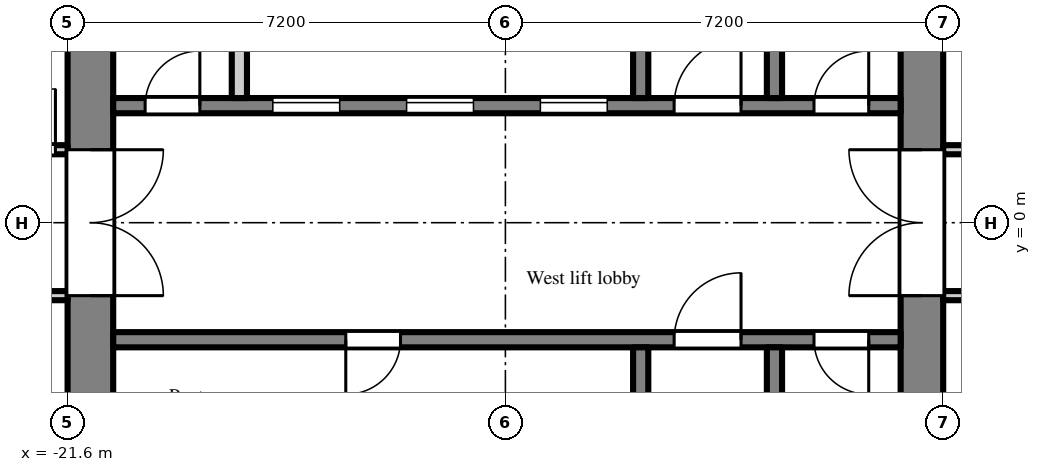
"""IFC4 building model, lengths in metres.
Left out: names, types, materials, properties, quantities, classifications, styles, units other than length and angle.
Written with IfcOpenShell. Run it as: python <this file> out.ifc"""

import sys

from ifc_helpers import new_model, si_unit, direction, frame, frame_2d, origin, place, context, subcontext, project, spatial, rectangle, extrude, element, fill, save


model = new_model("IFC4")
c1 = context("Model", 3, precision=1e-05, world=origin(), true_north=direction((0.0, 1.0)))
c2 = subcontext(c1, "Body", "Model", "MODEL_VIEW")
j1 = project(units=[si_unit("LENGTHUNIT", "METRE"), si_unit("PLANEANGLEUNIT", "RADIAN")], contexts=[c1])
p1 = place(None, origin())
s1 = spatial("IfcSite", under=j1, at=p1, CompositionType="ELEMENT")
p2 = place(p1, origin())
s2 = spatial("IfcBuilding", under=s1, at=p2, CompositionType="ELEMENT")
p3 = place(p2, frame((0.0, 0.0, 216.9)))
s3 = spatial("IfcBuildingStorey", under=s2, at=p3, CompositionType="ELEMENT", Elevation=216.9)
p4 = place(p3, frame((-7.55, -7.2, 0.0), z_axis=(0.0, 0.0, 1.0), x_axis=(0.0, 1.0, 0.0)))
e1 = element("IfcWall", 1, at=p4, inside=s3, PredefinedType="SHEAR", context=c2, shape_type="SweptSolid", body=[
    extrude(rectangle(XDim=14.4, YDim=0.7, at=frame_2d((7.2, 0.0))), origin(), (0.0, 0.0, 1.0), 2.6),
])
p5 = place(p4, frame((6.0, 0.0, 0.0)))
e2 = element("IfcOpeningElement", 2, at=p5, cuts=e1, PredefinedType="OPENING", context=c2, shape_type="SweptSolid", body=[
    extrude(rectangle(XDim=2.4, YDim=2.2, at=frame_2d((1.2, 1.1))), frame((0.0, 0.36, 0.0), z_axis=(0.0, -1.0, 0.0), x_axis=(1.0, 0.0, 0.0)), (0.0, 0.0, 1.0), 0.72),
])
p6 = place(p3, frame((-21.225, -7.2, 0.0), z_axis=(0.0, 0.0, 1.0), x_axis=(0.0, 1.0, 0.0)))
e3 = element("IfcWall", 3, at=p6, inside=s3, PredefinedType="SHEAR", context=c2, shape_type="SweptSolid", body=[
    extrude(rectangle(XDim=14.4, YDim=0.75, at=frame_2d((7.2, 0.0))), origin(), (0.0, 0.0, 1.0), 2.6),
])
p7 = place(p6, frame((6.0, 0.0, 0.0)))
e4 = element("IfcOpeningElement", 4, at=p7, cuts=e3, PredefinedType="OPENING", context=c2, shape_type="SweptSolid", body=[
    extrude(rectangle(XDim=2.4, YDim=2.2, at=frame_2d((1.2, 1.1))), frame((0.0, 0.385, 0.0), z_axis=(0.0, -1.0, 0.0), x_axis=(1.0, 0.0, 0.0)), (0.0, 0.0, 1.0), 0.77),
])
p8 = place(p3, frame((-7.9, 1.925, 0.0), z_axis=(0.0, 0.0, 1.0), x_axis=(-1.0, 0.0, 0.0)))
e5 = element("IfcWall", 5, at=p8, inside=s3, PredefinedType="SHEAR", context=c2, shape_type="SweptSolid", body=[
    extrude(rectangle(XDim=12.95, YDim=0.25, at=frame_2d((6.475, 0.0))), origin(), (0.0, 0.0, 1.0), 2.6),
])
p9 = place(p8, frame((4.825, 0.0, 0.0)))
e6 = element("IfcOpeningElement", 6, at=p9, cuts=e5, PredefinedType="OPENING", context=c2, shape_type="SweptSolid", body=[
    extrude(rectangle(XDim=1.1, YDim=2.1, at=frame_2d((0.55, 1.05))), frame((0.0, 0.135, 0.0), z_axis=(0.0, -1.0, 0.0), x_axis=(1.0, 0.0, 0.0)), (0.0, 0.0, 1.0), 0.27),
])
p10 = place(p8, frame((7.025, 0.0, 0.0)))
e7 = element("IfcOpeningElement", 7, at=p10, cuts=e5, PredefinedType="OPENING", context=c2, shape_type="SweptSolid", body=[
    extrude(rectangle(XDim=1.1, YDim=2.1, at=frame_2d((0.55, 1.05))), frame((0.0, 0.135, 0.0), z_axis=(0.0, -1.0, 0.0), x_axis=(1.0, 0.0, 0.0)), (0.0, 0.0, 1.0), 0.27),
])
p11 = place(p8, frame((9.225, 0.0, 0.0)))
e8 = element("IfcOpeningElement", 8, at=p11, cuts=e5, PredefinedType="OPENING", context=c2, shape_type="SweptSolid", body=[
    extrude(rectangle(XDim=1.1, YDim=2.1, at=frame_2d((0.55, 1.05))), frame((0.0, 0.135, 0.0), z_axis=(0.0, -1.0, 0.0), x_axis=(1.0, 0.0, 0.0)), (0.0, 0.0, 1.0), 0.27),
])
p12 = place(p8, frame((0.525, 0.0, 0.0)))
e9 = element("IfcOpeningElement", 9, at=p12, cuts=e5, PredefinedType="OPENING", context=c2, shape_type="SweptSolid", body=[
    extrude(rectangle(XDim=0.9, YDim=2.1, at=frame_2d((0.45, 1.05))), frame((0.0, 0.135, 0.0), z_axis=(0.0, -1.0, 0.0), x_axis=(1.0, 0.0, 0.0)), (0.0, 0.0, 1.0), 0.27),
])
p13 = place(p8, frame((2.625, 0.0, 0.0)))
e10 = element("IfcOpeningElement", 10, at=p13, cuts=e5, PredefinedType="OPENING", context=c2, shape_type="SweptSolid", body=[
    extrude(rectangle(XDim=1.1, YDim=2.1, at=frame_2d((0.55, 1.05))), frame((0.0, 0.135, 0.0), z_axis=(0.0, -1.0, 0.0), x_axis=(1.0, 0.0, 0.0)), (0.0, 0.0, 1.0), 0.27),
])
p14 = place(p8, frame((11.525, 0.0, 0.0)))
e11 = element("IfcOpeningElement", 11, at=p14, cuts=e5, PredefinedType="OPENING", context=c2, shape_type="SweptSolid", body=[
    extrude(rectangle(XDim=0.9, YDim=2.1, at=frame_2d((0.45, 1.05))), frame((0.0, 0.135, 0.0), z_axis=(0.0, -1.0, 0.0), x_axis=(1.0, 0.0, 0.0)), (0.0, 0.0, 1.0), 0.27),
])
p15 = place(p3, frame((-9.975, 2.05, 0.0), z_axis=(0.0, 0.0, 1.0), x_axis=(0.0, 1.0, 0.0)))
e12 = element("IfcWall", 12, at=p15, inside=s3, PredefinedType="SHEAR", context=c2, shape_type="SweptSolid", body=[
    extrude(rectangle(XDim=4.75, YDim=0.25, at=frame_2d((2.375, 0.0))), origin(), (0.0, 0.0, 1.0), 2.6),
])
p16 = place(p15, frame((2.95, 0.0, 0.0)))
e13 = element("IfcOpeningElement", 13, at=p16, cuts=e12, PredefinedType="OPENING", context=c2, shape_type="SweptSolid", body=[
    extrude(rectangle(XDim=1.1, YDim=2.1, at=frame_2d((0.55, 1.05))), frame((0.0, 0.135, 0.0), z_axis=(0.0, -1.0, 0.0), x_axis=(1.0, 0.0, 0.0)), (0.0, 0.0, 1.0), 0.27),
])
p17 = place(p3, frame((-12.175, 2.05, 0.0), z_axis=(0.0, 0.0, 1.0), x_axis=(0.0, 1.0, 0.0)))
e14 = element("IfcWall", 14, at=p17, inside=s3, PredefinedType="SHEAR", context=c2, shape_type="SweptSolid", body=[
    extrude(rectangle(XDim=4.75, YDim=0.25, at=frame_2d((2.375, 0.0))), origin(), (0.0, 0.0, 1.0), 2.6),
])
p18 = place(p17, frame((3.0, 0.0, 0.0)))
e15 = element("IfcOpeningElement", 15, at=p18, cuts=e14, PredefinedType="OPENING", context=c2, shape_type="SweptSolid", body=[
    extrude(rectangle(XDim=1.1, YDim=2.1, at=frame_2d((0.55, 1.05))), frame((0.0, 0.135, 0.0), z_axis=(0.0, -1.0, 0.0), x_axis=(1.0, 0.0, 0.0)), (0.0, 0.0, 1.0), 0.27),
])
p19 = place(p3, frame((-18.775, 2.05, 0.0), z_axis=(0.0, 0.0, 1.0), x_axis=(0.0, 1.0, 0.0)))
e16 = element("IfcWall", 16, at=p19, inside=s3, PredefinedType="PARTITIONING", context=c2, shape_type="SweptSolid", body=[
    extrude(rectangle(XDim=2.1, YDim=0.25, at=frame_2d((1.05, 0.0))), origin(), (0.0, 0.0, 1.0), 2.6),
])
p20 = place(p3, frame((-7.9, -1.925, 0.0), z_axis=(0.0, 0.0, 1.0), x_axis=(-1.0, 0.0, 0.0)))
e17 = element("IfcWall", 17, at=p20, inside=s3, PredefinedType="SHEAR", context=c2, shape_type="SweptSolid", body=[
    extrude(rectangle(XDim=12.95, YDim=0.25, at=frame_2d((6.475, 0.0))), origin(), (0.0, 0.0, 1.0), 2.6),
])
p21 = place(p20, frame((0.525, 0.0, 0.0)))
e18 = element("IfcOpeningElement", 18, at=p21, cuts=e17, PredefinedType="OPENING", context=c2, shape_type="SweptSolid", body=[
    extrude(rectangle(XDim=0.9, YDim=2.1, at=frame_2d((0.45, 1.05))), frame((0.0, 0.135, 0.0), z_axis=(0.0, -1.0, 0.0), x_axis=(1.0, 0.0, 0.0)), (0.0, 0.0, 1.0), 0.27),
])
p22 = place(p20, frame((2.625, 0.0, 0.0)))
e19 = element("IfcOpeningElement", 19, at=p22, cuts=e17, PredefinedType="OPENING", context=c2, shape_type="SweptSolid", body=[
    extrude(rectangle(XDim=1.1, YDim=2.1, at=frame_2d((0.55, 1.05))), frame((0.0, 0.135, 0.0), z_axis=(0.0, -1.0, 0.0), x_axis=(1.0, 0.0, 0.0)), (0.0, 0.0, 1.0), 0.27),
])
p23 = place(p20, frame((8.225, 0.0, 0.0)))
e20 = element("IfcOpeningElement", 20, at=p23, cuts=e17, PredefinedType="OPENING", context=c2, shape_type="SweptSolid", body=[
    extrude(rectangle(XDim=0.9, YDim=2.1, at=frame_2d((0.45, 1.05))), frame((0.0, 0.135, 0.0), z_axis=(0.0, -1.0, 0.0), x_axis=(1.0, 0.0, 0.0)), (0.0, 0.0, 1.0), 0.27),
])
p24 = place(p3, frame((-9.975, -2.05, 0.0), z_axis=(0.0, 0.0, 1.0), x_axis=(0.0, -1.0, 0.0)))
e21 = element("IfcWall", 21, at=p24, inside=s3, PredefinedType="SHEAR", context=c2, shape_type="SweptSolid", body=[
    extrude(rectangle(XDim=4.75, YDim=0.25, at=frame_2d((2.375, 0.0))), origin(), (0.0, 0.0, 1.0), 2.6),
])
p25 = place(p24, frame((2.95, 0.0, 0.0)))
e22 = element("IfcOpeningElement", 22, at=p25, cuts=e21, PredefinedType="OPENING", context=c2, shape_type="SweptSolid", body=[
    extrude(rectangle(XDim=1.1, YDim=2.1, at=frame_2d((0.55, 1.05))), frame((0.0, 0.135, 0.0), z_axis=(0.0, -1.0, 0.0), x_axis=(1.0, 0.0, 0.0)), (0.0, 0.0, 1.0), 0.27),
])
p26 = place(p3, frame((-12.175, -2.05, 0.0), z_axis=(0.0, 0.0, 1.0), x_axis=(0.0, -1.0, 0.0)))
e23 = element("IfcWall", 23, at=p26, inside=s3, PredefinedType="SHEAR", context=c2, shape_type="SweptSolid", body=[
    extrude(rectangle(XDim=4.75, YDim=0.25, at=frame_2d((2.375, 0.0))), origin(), (0.0, 0.0, 1.0), 2.6),
])
p27 = place(p26, frame((3.0, 0.0, 0.0)))
e24 = element("IfcOpeningElement", 24, at=p27, cuts=e23, PredefinedType="OPENING", context=c2, shape_type="SweptSolid", body=[
    extrude(rectangle(XDim=1.1, YDim=2.1, at=frame_2d((0.55, 1.05))), frame((0.0, 0.135, 0.0), z_axis=(0.0, -1.0, 0.0), x_axis=(1.0, 0.0, 0.0)), (0.0, 0.0, 1.0), 0.27),
])
p28 = place(p3, frame((-26.725, -1.2, 0.0), z_axis=(0.0, 0.0, 1.0), x_axis=(1.0, 0.0, 0.0)))
e25 = element("IfcWall", 25, at=p28, inside=s3, PredefinedType="PARTITIONING", context=c2, shape_type="SweptSolid", body=[
    extrude(rectangle(XDim=5.125, YDim=0.15, at=frame_2d((2.562, 0.0))), origin(), (0.0, 0.0, 1.0), 2.6),
])
p29 = place(p28, frame((1.625, 0.0, 0.0)))
e26 = element("IfcOpeningElement", 26, at=p29, cuts=e25, PredefinedType="OPENING", context=c2, shape_type="SweptSolid", body=[
    extrude(rectangle(XDim=1.8, YDim=2.1, at=frame_2d((0.9, 1.05))), frame((0.0, 0.085, 0.0), z_axis=(0.0, -1.0, 0.0), x_axis=(1.0, 0.0, 0.0)), (0.0, 0.0, 1.0), 0.17),
])
p30 = place(p3, frame((-26.725, 1.2, 0.0), z_axis=(0.0, 0.0, 1.0), x_axis=(1.0, 0.0, 0.0)))
e27 = element("IfcWall", 27, at=p30, inside=s3, PredefinedType="PARTITIONING", context=c2, shape_type="SweptSolid", body=[
    extrude(rectangle(XDim=5.125, YDim=0.15, at=frame_2d((2.562, 0.0))), origin(), (0.0, 0.0, 1.0), 2.6),
])
p31 = place(p30, frame((3.925, 0.0, 0.0)))
e28 = element("IfcOpeningElement", 28, at=p31, cuts=e27, PredefinedType="OPENING", context=c2, shape_type="SweptSolid", body=[
    extrude(rectangle(XDim=1.0, YDim=2.1, at=frame_2d((0.5, 1.05))), frame((0.0, 0.085, 0.0), z_axis=(0.0, -1.0, 0.0), x_axis=(1.0, 0.0, 0.0)), (0.0, 0.0, 1.0), 0.17),
])
p32 = place(p3, frame((-7.2, -1.2, 0.0), z_axis=(0.0, 0.0, 1.0), x_axis=(1.0, 0.0, 0.0)))
e29 = element("IfcWall", 29, at=p32, inside=s3, PredefinedType="PARTITIONING", context=c2, shape_type="SweptSolid", body=[
    extrude(rectangle(XDim=6.075, YDim=0.15, at=frame_2d((3.038, 0.0))), origin(), (0.0, 0.0, 1.0), 2.6),
])
p33 = place(p32, frame((2.55, 0.0, 0.0)))
e30 = element("IfcOpeningElement", 30, at=p33, cuts=e29, PredefinedType="OPENING", context=c2, shape_type="SweptSolid", body=[
    extrude(rectangle(XDim=0.9, YDim=2.1, at=frame_2d((0.45, 1.05))), frame((0.0, 0.085, 0.0), z_axis=(0.0, -1.0, 0.0), x_axis=(1.0, 0.0, 0.0)), (0.0, 0.0, 1.0), 0.17),
])
p34 = place(p3, frame((-7.2, 1.2, 0.0), z_axis=(0.0, 0.0, 1.0), x_axis=(1.0, 0.0, 0.0)))
e31 = element("IfcWall", 31, at=p34, inside=s3, PredefinedType="PARTITIONING", context=c2, shape_type="SweptSolid", body=[
    extrude(rectangle(XDim=6.075, YDim=0.15, at=frame_2d((3.038, 0.0))), origin(), (0.0, 0.0, 1.0), 2.6),
])
p35 = place(p34, frame((0.55, 0.0, 0.0)))
e32 = element("IfcOpeningElement", 32, at=p35, cuts=e31, PredefinedType="OPENING", context=c2, shape_type="SweptSolid", body=[
    extrude(rectangle(XDim=0.9, YDim=2.1, at=frame_2d((0.45, 1.05))), frame((0.0, 0.085, 0.0), z_axis=(0.0, -1.0, 0.0), x_axis=(1.0, 0.0, 0.0)), (0.0, 0.0, 1.0), 0.17),
])
p36 = place(p9, origin())
e33 = element("IfcDoor", 33, at=p36, inside=s3, OperationType="SLIDING_TO_LEFT", PredefinedType="DOOR", context=c2, shape_type="SweptSolid", body=[
    extrude(rectangle(XDim=1.1, YDim=2.1, at=frame_2d((0.55, 1.05))), frame((0.0, 0.025, 0.0), z_axis=(0.0, -1.0, 0.0), x_axis=(1.0, 0.0, 0.0)), (0.0, 0.0, 1.0), 0.05),
])
fill(e6, e33)
p37 = place(p10, origin())
e34 = element("IfcDoor", 34, at=p37, inside=s3, OperationType="SLIDING_TO_LEFT", PredefinedType="DOOR", context=c2, shape_type="SweptSolid", body=[
    extrude(rectangle(XDim=1.1, YDim=2.1, at=frame_2d((0.55, 1.05))), frame((0.0, 0.025, 0.0), z_axis=(0.0, -1.0, 0.0), x_axis=(1.0, 0.0, 0.0)), (0.0, 0.0, 1.0), 0.05),
])
fill(e7, e34)
p38 = place(p11, origin())
e35 = element("IfcDoor", 35, at=p38, inside=s3, OperationType="SLIDING_TO_LEFT", PredefinedType="DOOR", context=c2, shape_type="SweptSolid", body=[
    extrude(rectangle(XDim=1.1, YDim=2.1, at=frame_2d((0.55, 1.05))), frame((0.0, 0.025, 0.0), z_axis=(0.0, -1.0, 0.0), x_axis=(1.0, 0.0, 0.0)), (0.0, 0.0, 1.0), 0.05),
])
fill(e8, e35)
p39 = place(p12, frame((0.9, 0.0, 0.0), z_axis=(0.0, 0.0, 1.0), x_axis=(-1.0, 0.0, 0.0)))
e36 = element("IfcDoor", 36, at=p39, inside=s3, OperationType="SINGLE_SWING_RIGHT", PredefinedType="DOOR", context=c2, shape_type="SweptSolid", body=[
    extrude(rectangle(XDim=0.9, YDim=2.1, at=frame_2d((0.45, 1.05))), frame((0.0, 0.025, 0.0), z_axis=(0.0, -1.0, 0.0), x_axis=(1.0, 0.0, 0.0)), (0.0, 0.0, 1.0), 0.05),
])
fill(e9, e36)
p40 = place(p21, origin())
e37 = element("IfcDoor", 37, at=p40, inside=s3, OperationType="SINGLE_SWING_LEFT", PredefinedType="DOOR", context=c2, shape_type="SweptSolid", body=[
    extrude(rectangle(XDim=0.9, YDim=2.1, at=frame_2d((0.45, 1.05))), frame((0.0, 0.025, 0.0), z_axis=(0.0, -1.0, 0.0), x_axis=(1.0, 0.0, 0.0)), (0.0, 0.0, 1.0), 0.05),
])
fill(e18, e37)
p41 = place(p13, frame((1.1, 0.0, 0.0), z_axis=(0.0, 0.0, 1.0), x_axis=(-1.0, 0.0, 0.0)))
e38 = element("IfcDoor", 38, at=p41, inside=s3, OperationType="SINGLE_SWING_RIGHT", PredefinedType="DOOR", context=c2, shape_type="SweptSolid", body=[
    extrude(rectangle(XDim=1.1, YDim=2.1, at=frame_2d((0.55, 1.05))), frame((0.0, 0.025, 0.0), z_axis=(0.0, -1.0, 0.0), x_axis=(1.0, 0.0, 0.0)), (0.0, 0.0, 1.0), 0.05),
])
fill(e10, e38)
p42 = place(p22, frame((1.1, 0.0, 0.0), z_axis=(0.0, 0.0, 1.0), x_axis=(-1.0, 0.0, 0.0)))
e39 = element("IfcDoor", 39, at=p42, inside=s3, OperationType="SINGLE_SWING_RIGHT", PredefinedType="DOOR", context=c2, shape_type="SweptSolid", body=[
    extrude(rectangle(XDim=1.1, YDim=2.1, at=frame_2d((0.55, 1.05))), frame((0.0, 0.025, 0.0), z_axis=(0.0, -1.0, 0.0), x_axis=(1.0, 0.0, 0.0)), (0.0, 0.0, 1.0), 0.05),
])
fill(e19, e39)
p43 = place(p5, origin())
e40 = element("IfcDoor", 40, at=p43, inside=s3, OperationType="DOUBLE_DOOR_DOUBLE_SWING", PredefinedType="DOOR", context=c2, shape_type="SweptSolid", body=[
    extrude(rectangle(XDim=2.4, YDim=2.2, at=frame_2d((1.2, 1.1))), frame((0.0, 0.025, 0.0), z_axis=(0.0, -1.0, 0.0), x_axis=(1.0, 0.0, 0.0)), (0.0, 0.0, 1.0), 0.05),
])
fill(e2, e40)
p44 = place(p7, frame((2.4, 0.0, 0.0), z_axis=(0.0, 0.0, 1.0), x_axis=(-1.0, 0.0, 0.0)))
e41 = element("IfcDoor", 41, at=p44, inside=s3, OperationType="DOUBLE_DOOR_DOUBLE_SWING", PredefinedType="DOOR", context=c2, shape_type="SweptSolid", body=[
    extrude(rectangle(XDim=2.4, YDim=2.2, at=frame_2d((1.2, 1.1))), frame((0.0, 0.025, 0.0), z_axis=(0.0, -1.0, 0.0), x_axis=(1.0, 0.0, 0.0)), (0.0, 0.0, 1.0), 0.05),
])
fill(e4, e41)
p45 = place(p14, frame((0.9, 0.0, 0.0), z_axis=(0.0, 0.0, 1.0), x_axis=(-1.0, 0.0, 0.0)))
e42 = element("IfcDoor", 42, at=p45, inside=s3, OperationType="SINGLE_SWING_RIGHT", PredefinedType="DOOR", context=c2, shape_type="SweptSolid", body=[
    extrude(rectangle(XDim=0.9, YDim=2.1, at=frame_2d((0.45, 1.05))), frame((0.0, 0.025, 0.0), z_axis=(0.0, -1.0, 0.0), x_axis=(1.0, 0.0, 0.0)), (0.0, 0.0, 1.0), 0.05),
])
fill(e11, e42)
p46 = place(p23, origin())
e43 = element("IfcDoor", 43, at=p46, inside=s3, OperationType="SINGLE_SWING_RIGHT", PredefinedType="DOOR", context=c2, shape_type="SweptSolid", body=[
    extrude(rectangle(XDim=0.9, YDim=2.1, at=frame_2d((0.45, 1.05))), frame((0.0, 0.025, 0.0), z_axis=(0.0, -1.0, 0.0), x_axis=(1.0, 0.0, 0.0)), (0.0, 0.0, 1.0), 0.05),
])
fill(e20, e43)
p47 = place(p31, origin())
e44 = element("IfcDoor", 44, at=p47, inside=s3, OperationType="SINGLE_SWING_RIGHT", PredefinedType="DOOR", context=c2, shape_type="SweptSolid", body=[
    extrude(rectangle(XDim=1.0, YDim=2.1, at=frame_2d((0.5, 1.05))), frame((0.0, 0.025, 0.0), z_axis=(0.0, -1.0, 0.0), x_axis=(1.0, 0.0, 0.0)), (0.0, 0.0, 1.0), 0.05),
])
fill(e28, e44)
save(model, sys.argv[1])
